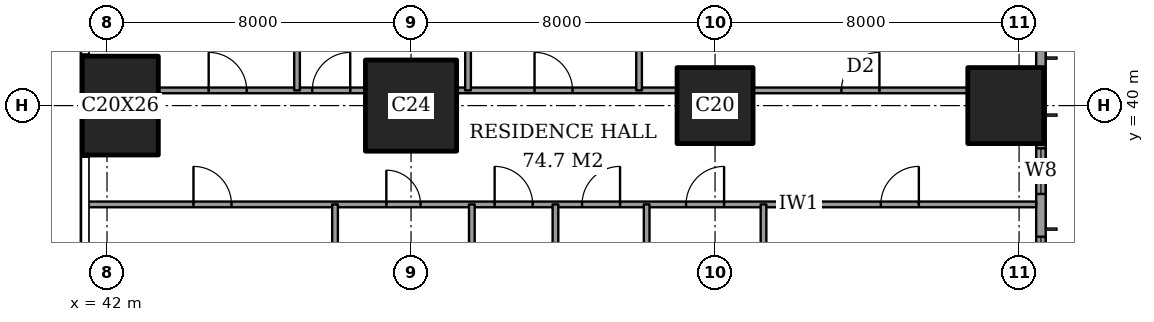
"""IFC4 building model, lengths in metres.
Left out: names, types, materials, properties, quantities, classifications, styles, units other than length and angle.
Written with IfcOpenShell. Run it as: python <this file> out.ifc"""

import sys

from ifc_helpers import new_model, si_unit, direction, frame, frame_2d, origin, origin_2d, place, context, subcontext, project, spatial, rectangle, extrude, element, fill, save


model = new_model("IFC4")
c1 = context("Model", 3, precision=1e-05, world=origin(), true_north=direction((0.0, 1.0)))
c2 = subcontext(c1, "Body", "Model", "MODEL_VIEW")
j1 = project(units=[si_unit("LENGTHUNIT", "METRE"), si_unit("PLANEANGLEUNIT", "RADIAN")], contexts=[c1])
p1 = place(None, origin())
s1 = spatial("IfcSite", under=j1, at=p1, CompositionType="ELEMENT")
p2 = place(p1, origin())
s2 = spatial("IfcBuilding", under=s1, at=p2, CompositionType="ELEMENT")
p3 = place(p2, frame((0.0, 0.0, 76.4)))
s3 = spatial("IfcBuildingStorey", under=s2, at=p3, CompositionType="ELEMENT", Elevation=76.4)
p4 = place(p3, frame((42.35, 40.0, 0.0), z_axis=(0.0, 0.0, 1.0), x_axis=(1.0, 0.0, 0.0)))
e1 = element("IfcColumn", 1, at=p4, inside=s3, PredefinedType="COLUMN", context=c2, shape_type="SweptSolid", body=[
    extrude(rectangle(XDim=2.0, YDim=2.6, at=origin_2d()), origin(), (0.0, 0.0, 1.0), 3.6),
])
p5 = place(p3, frame((50.0, 40.0, 0.0), z_axis=(0.0, 0.0, 1.0), x_axis=(1.0, 0.0, 0.0)))
e2 = element("IfcColumn", 2, at=p5, inside=s3, PredefinedType="COLUMN", context=c2, shape_type="SweptSolid", body=[
    extrude(rectangle(XDim=2.4, YDim=2.4, at=origin_2d()), origin(), (0.0, 0.0, 1.0), 3.6),
])
for number, where, z_axis, x_axis in (
    (3, (58.0, 40.0, 0.0), (0.0, 0.0, 1.0), (1.0, 0.0, 0.0)),
    (4, (65.65, 40.0, 0.0), (0.0, 0.0, 1.0), (1.0, 0.0, 0.0)),
):
    element("IfcColumn", number, at=place(p3, frame(where, z_axis=z_axis, x_axis=x_axis)), inside=s3, PredefinedType="COLUMN", context=c2, shape_type="SweptSolid", body=[
        extrude(rectangle(XDim=2.0, YDim=2.0, at=origin_2d()), origin(), (0.0, 0.0, 1.0), 3.6),
    ])
p6 = place(p3, frame((66.575, 3.175, 0.0), z_axis=(0.0, 0.0, 1.0), x_axis=(0.0, 1.0, 0.0)))
e5 = element("IfcWall", 5, at=p6, inside=s3, PredefinedType="SOLIDWALL", context=c2, shape_type="SweptSolid", body=[
    extrude(rectangle(XDim=41.65, YDim=0.25, at=frame_2d((20.825, 0.0))), origin(), (0.0, 0.0, 1.0), 3.6),
])
p7 = place(p6, frame((0.775, 0.0, 0.6)))
e6 = element("IfcOpeningElement", 6, at=p7, cuts=e5, PredefinedType="OPENING", context=c2, shape_type="SweptSolid", body=[
    extrude(rectangle(XDim=2.4, YDim=2.0, at=frame_2d((1.2, 1.0))), frame((0.0, 0.135, 0.0), z_axis=(0.0, -1.0, 0.0), x_axis=(1.0, 0.0, 0.0)), (0.0, 0.0, 1.0), 0.27),
])
p8 = place(p6, frame((6.1, 0.0, 0.6)))
e7 = element("IfcOpeningElement", 7, at=p8, cuts=e5, PredefinedType="OPENING", context=c2, shape_type="SweptSolid", body=[
    extrude(rectangle(XDim=1.2, YDim=2.0, at=frame_2d((0.6, 1.0))), frame((0.0, 0.135, 0.0), z_axis=(0.0, -1.0, 0.0), x_axis=(1.0, 0.0, 0.0)), (0.0, 0.0, 1.0), 0.27),
])
p9 = place(p6, frame((8.275, 0.0, 0.6)))
e8 = element("IfcOpeningElement", 8, at=p9, cuts=e5, PredefinedType="OPENING", context=c2, shape_type="SweptSolid", body=[
    extrude(rectangle(XDim=2.4, YDim=2.0, at=frame_2d((1.2, 1.0))), frame((0.0, 0.135, 0.0), z_axis=(0.0, -1.0, 0.0), x_axis=(1.0, 0.0, 0.0)), (0.0, 0.0, 1.0), 0.27),
])
p10 = place(p6, frame((15.775, 0.0, 0.6)))
e9 = element("IfcOpeningElement", 9, at=p10, cuts=e5, PredefinedType="OPENING", context=c2, shape_type="SweptSolid", body=[
    extrude(rectangle(XDim=2.4, YDim=2.0, at=frame_2d((1.2, 1.0))), frame((0.0, 0.135, 0.0), z_axis=(0.0, -1.0, 0.0), x_axis=(1.0, 0.0, 0.0)), (0.0, 0.0, 1.0), 0.27),
])
p11 = place(p6, frame((23.475, 0.0, 0.6)))
e10 = element("IfcOpeningElement", 10, at=p11, cuts=e5, PredefinedType="OPENING", context=c2, shape_type="SweptSolid", body=[
    extrude(rectangle(XDim=2.4, YDim=2.0, at=frame_2d((1.2, 1.0))), frame((0.0, 0.135, 0.0), z_axis=(0.0, -1.0, 0.0), x_axis=(1.0, 0.0, 0.0)), (0.0, 0.0, 1.0), 0.27),
])
p12 = place(p6, frame((30.975, 0.0, 0.6)))
e11 = element("IfcOpeningElement", 11, at=p12, cuts=e5, PredefinedType="OPENING", context=c2, shape_type="SweptSolid", body=[
    extrude(rectangle(XDim=2.4, YDim=2.0, at=frame_2d((1.2, 1.0))), frame((0.0, 0.135, 0.0), z_axis=(0.0, -1.0, 0.0), x_axis=(1.0, 0.0, 0.0)), (0.0, 0.0, 1.0), 0.27),
])
p13 = place(p6, frame((34.5, 0.0, 0.6)))
e12 = element("IfcOpeningElement", 12, at=p13, cuts=e5, PredefinedType="OPENING", context=c2, shape_type="SweptSolid", body=[
    extrude(rectangle(XDim=1.2, YDim=2.0, at=frame_2d((0.6, 1.0))), frame((0.0, 0.135, 0.0), z_axis=(0.0, -1.0, 0.0), x_axis=(1.0, 0.0, 0.0)), (0.0, 0.0, 1.0), 0.27),
])
p14 = place(p6, frame((38.475, 0.0, 0.6)))
e13 = element("IfcOpeningElement", 13, at=p14, cuts=e5, PredefinedType="OPENING", context=c2, shape_type="SweptSolid", body=[
    extrude(rectangle(XDim=2.4, YDim=2.0, at=frame_2d((1.2, 1.0))), frame((0.0, 0.135, 0.0), z_axis=(0.0, -1.0, 0.0), x_axis=(1.0, 0.0, 0.0)), (0.0, 0.0, 1.0), 0.27),
])
p15 = place(p3, frame((41.439, 37.4, 0.0), z_axis=(0.0, 0.0, 1.0), x_axis=(1.0, 0.0, 0.0)))
e14 = element("IfcWall", 14, at=p15, inside=s3, PredefinedType="PARTITIONING", context=c2, shape_type="SweptSolid", body=[
    extrude(rectangle(XDim=25.011, YDim=0.15, at=frame_2d((12.505, 0.0))), origin(), (0.0, 0.0, 1.0), 3.35),
])
p16 = place(p15, frame((10.761, 0.0, 0.0)))
e15 = element("IfcOpeningElement", 15, at=p16, cuts=e14, PredefinedType="OPENING", context=c2, shape_type="SweptSolid", body=[
    extrude(rectangle(XDim=1.0, YDim=2.1, at=frame_2d((0.5, 1.05))), frame((0.0, 0.085, 0.0), z_axis=(0.0, -1.0, 0.0), x_axis=(1.0, 0.0, 0.0)), (0.0, 0.0, 1.0), 0.17),
])
p17 = place(p15, frame((20.924, 0.0, 0.0)))
e16 = element("IfcOpeningElement", 16, at=p17, cuts=e14, PredefinedType="OPENING", context=c2, shape_type="SweptSolid", body=[
    extrude(rectangle(XDim=1.0, YDim=2.1, at=frame_2d((0.5, 1.05))), frame((0.0, 0.085, 0.0), z_axis=(0.0, -1.0, 0.0), x_axis=(1.0, 0.0, 0.0)), (0.0, 0.0, 1.0), 0.17),
])
p18 = place(p15, frame((15.799, 0.0, 0.0)))
e17 = element("IfcOpeningElement", 17, at=p18, cuts=e14, PredefinedType="OPENING", context=c2, shape_type="SweptSolid", body=[
    extrude(rectangle(XDim=1.0, YDim=2.1, at=frame_2d((0.5, 1.05))), frame((0.0, 0.085, 0.0), z_axis=(0.0, -1.0, 0.0), x_axis=(1.0, 0.0, 0.0)), (0.0, 0.0, 1.0), 0.17),
])
p19 = place(p15, frame((13.061, 0.0, 0.0)))
e18 = element("IfcOpeningElement", 18, at=p19, cuts=e14, PredefinedType="OPENING", context=c2, shape_type="SweptSolid", body=[
    extrude(rectangle(XDim=1.0, YDim=2.1, at=frame_2d((0.5, 1.05))), frame((0.0, 0.085, 0.0), z_axis=(0.0, -1.0, 0.0), x_axis=(1.0, 0.0, 0.0)), (0.0, 0.0, 1.0), 0.17),
])
p20 = place(p15, frame((7.911, 0.0, 0.0)))
e19 = element("IfcOpeningElement", 19, at=p20, cuts=e14, PredefinedType="OPENING", context=c2, shape_type="SweptSolid", body=[
    extrude(rectangle(XDim=0.9, YDim=2.1, at=frame_2d((0.45, 1.05))), frame((0.0, 0.085, 0.0), z_axis=(0.0, -1.0, 0.0), x_axis=(1.0, 0.0, 0.0)), (0.0, 0.0, 1.0), 0.17),
])
p21 = place(p15, frame((2.836, 0.0, 0.0)))
e20 = element("IfcOpeningElement", 20, at=p21, cuts=e14, PredefinedType="OPENING", context=c2, shape_type="SweptSolid", body=[
    extrude(rectangle(XDim=1.0, YDim=2.1, at=frame_2d((0.5, 1.05))), frame((0.0, 0.085, 0.0), z_axis=(0.0, -1.0, 0.0), x_axis=(1.0, 0.0, 0.0)), (0.0, 0.0, 1.0), 0.17),
])
p22 = place(p3, frame((43.35, 40.4, 0.0), z_axis=(0.0, 0.0, 1.0), x_axis=(1.0, 0.0, 0.0)))
e21 = element("IfcWall", 21, at=p22, inside=s3, PredefinedType="PARTITIONING", context=c2, shape_type="SweptSolid", body=[
    extrude(rectangle(XDim=5.45, YDim=0.15, at=frame_2d((2.725, 0.0))), origin(), (0.0, 0.0, 1.0), 3.35),
])
p23 = place(p22, frame((4.05, 0.0, 0.0)))
e22 = element("IfcOpeningElement", 22, at=p23, cuts=e21, PredefinedType="OPENING", context=c2, shape_type="SweptSolid", body=[
    extrude(rectangle(XDim=1.0, YDim=2.1, at=frame_2d((0.5, 1.05))), frame((0.0, 0.085, 0.0), z_axis=(0.0, -1.0, 0.0), x_axis=(1.0, 0.0, 0.0)), (0.0, 0.0, 1.0), 0.17),
])
p24 = place(p22, frame((1.325, 0.0, 0.0)))
e23 = element("IfcOpeningElement", 23, at=p24, cuts=e21, PredefinedType="OPENING", context=c2, shape_type="SweptSolid", body=[
    extrude(rectangle(XDim=1.0, YDim=2.1, at=frame_2d((0.5, 1.05))), frame((0.0, 0.085, 0.0), z_axis=(0.0, -1.0, 0.0), x_axis=(1.0, 0.0, 0.0)), (0.0, 0.0, 1.0), 0.17),
])
p25 = place(p3, frame((51.2, 40.4, 0.0), z_axis=(0.0, 0.0, 1.0), x_axis=(1.0, 0.0, 0.0)))
e24 = element("IfcWall", 24, at=p25, inside=s3, PredefinedType="PARTITIONING", context=c2, shape_type="SweptSolid", body=[
    extrude(rectangle(XDim=5.8, YDim=0.15, at=frame_2d((2.9, 0.0))), origin(), (0.0, 0.0, 1.0), 3.35),
])
p26 = place(p25, frame((2.05, 0.0, 0.0)))
e25 = element("IfcOpeningElement", 25, at=p26, cuts=e24, PredefinedType="OPENING", context=c2, shape_type="SweptSolid", body=[
    extrude(rectangle(XDim=1.0, YDim=2.1, at=frame_2d((0.5, 1.05))), frame((0.0, 0.085, 0.0), z_axis=(0.0, -1.0, 0.0), x_axis=(1.0, 0.0, 0.0)), (0.0, 0.0, 1.0), 0.17),
])
p27 = place(p3, frame((59.0, 40.4, 0.0), z_axis=(0.0, 0.0, 1.0), x_axis=(1.0, 0.0, 0.0)))
e26 = element("IfcWall", 26, at=p27, inside=s3, PredefinedType="PARTITIONING", context=c2, shape_type="SweptSolid", body=[
    extrude(rectangle(XDim=5.65, YDim=0.15, at=frame_2d((2.825, 0.0))), origin(), (0.0, 0.0, 1.0), 3.35),
])
p28 = place(p27, frame((2.325, 0.0, 0.0)))
e27 = element("IfcOpeningElement", 27, at=p28, cuts=e26, PredefinedType="OPENING", context=c2, shape_type="SweptSolid", body=[
    extrude(rectangle(XDim=1.0, YDim=2.1, at=frame_2d((0.5, 1.05))), frame((0.0, 0.085, 0.0), z_axis=(0.0, -1.0, 0.0), x_axis=(1.0, 0.0, 0.0)), (0.0, 0.0, 1.0), 0.17),
])
p29 = place(p3, frame((47.0, 40.4, 0.0), z_axis=(0.0, 0.0, 1.0), x_axis=(0.0, 1.0, 0.0)))
e28 = element("IfcWall", 28, at=p29, inside=s3, PredefinedType="PARTITIONING", context=c2, shape_type="SweptSolid", body=[
    extrude(rectangle(XDim=8.05, YDim=0.15, at=frame_2d((4.025, 0.0))), origin(), (0.0, 0.0, 1.0), 3.35),
])
p30 = place(p3, frame((48.0, 28.0, 0.0), z_axis=(0.0, 0.0, 1.0), x_axis=(0.0, 1.0, 0.0)))
e29 = element("IfcWall", 29, at=p30, inside=s3, PredefinedType="PARTITIONING", context=c2, shape_type="SweptSolid", body=[
    extrude(rectangle(XDim=9.4, YDim=0.15, at=frame_2d((4.7, 0.0))), origin(), (0.0, 0.0, 1.0), 3.35),
])
p31 = place(p30, frame((0.325, 0.0, 0.0)))
e30 = element("IfcOpeningElement", 30, at=p31, cuts=e29, PredefinedType="OPENING", context=c2, shape_type="SweptSolid", body=[
    extrude(rectangle(XDim=0.9, YDim=2.1, at=frame_2d((0.45, 1.05))), frame((0.0, 0.085, 0.0), z_axis=(0.0, -1.0, 0.0), x_axis=(1.0, 0.0, 0.0)), (0.0, 0.0, 1.0), 0.17),
])
p32 = place(p3, frame((51.5, 40.4, 0.0), z_axis=(0.0, 0.0, 1.0), x_axis=(0.0, 1.0, 0.0)))
e31 = element("IfcWall", 31, at=p32, inside=s3, PredefinedType="PARTITIONING", context=c2, shape_type="SweptSolid", body=[
    extrude(rectangle(XDim=8.05, YDim=0.15, at=frame_2d((4.025, 0.0))), origin(), (0.0, 0.0, 1.0), 3.35),
])
for number, where, z_axis, x_axis in (
    (32, (51.6, 29.55, 0.0), (0.0, 0.0, 1.0), (0.0, 1.0, 0.0)),
    (33, (53.8, 29.55, 0.0), (0.0, 0.0, 1.0), (0.0, 1.0, 0.0)),
):
    element("IfcWall", number, at=place(p3, frame(where, z_axis=z_axis, x_axis=x_axis)), inside=s3, PredefinedType="PARTITIONING", context=c2, shape_type="SweptSolid", body=[
        extrude(rectangle(XDim=7.85, YDim=0.15, at=frame_2d((3.925, 0.0))), origin(), (0.0, 0.0, 1.0), 3.35),
    ])
p33 = place(p3, frame((56.0, 40.4, 0.0), z_axis=(0.0, 0.0, 1.0), x_axis=(0.0, 1.0, 0.0)))
e34 = element("IfcWall", 34, at=p33, inside=s3, PredefinedType="PARTITIONING", context=c2, shape_type="SweptSolid", body=[
    extrude(rectangle(XDim=8.05, YDim=0.15, at=frame_2d((4.025, 0.0))), origin(), (0.0, 0.0, 1.0), 3.35),
])
p34 = place(p3, frame((56.2, 28.0, 0.0), z_axis=(0.0, 0.0, 1.0), x_axis=(0.0, 1.0, 0.0)))
e35 = element("IfcWall", 35, at=p34, inside=s3, PredefinedType="PARTITIONING", context=c2, shape_type="SweptSolid", body=[
    extrude(rectangle(XDim=9.4, YDim=0.15, at=frame_2d((4.7, 0.0))), origin(), (0.0, 0.0, 1.0), 3.35),
])
p35 = place(p34, frame((0.325, 0.0, 0.0)))
e36 = element("IfcOpeningElement", 36, at=p35, cuts=e35, PredefinedType="OPENING", context=c2, shape_type="SweptSolid", body=[
    extrude(rectangle(XDim=0.9, YDim=2.1, at=frame_2d((0.45, 1.05))), frame((0.0, 0.085, 0.0), z_axis=(0.0, -1.0, 0.0), x_axis=(1.0, 0.0, 0.0)), (0.0, 0.0, 1.0), 0.17),
])
p36 = place(p3, frame((59.275, 33.2, 0.0), z_axis=(0.0, 0.0, 1.0), x_axis=(0.0, 1.0, 0.0)))
e37 = element("IfcWall", 37, at=p36, inside=s3, PredefinedType="PARTITIONING", context=c2, shape_type="SweptSolid", body=[
    extrude(rectangle(XDim=4.2, YDim=0.15, at=frame_2d((2.1, 0.0))), origin(), (0.0, 0.0, 1.0), 3.35),
])
p37 = place(p12, origin())
e38 = element("IfcWindow", 38, at=p37, inside=s3, PartitioningType="SINGLE_PANEL", PredefinedType="WINDOW", context=c2, shape_type="SweptSolid", body=[
    extrude(rectangle(XDim=2.4, YDim=2.0, at=frame_2d((1.2, 1.0))), frame((0.0, 0.03, 0.0), z_axis=(0.0, -1.0, 0.0), x_axis=(1.0, 0.0, 0.0)), (0.0, 0.0, 1.0), 0.06),
])
fill(e11, e38)
p38 = place(p13, origin())
e39 = element("IfcWindow", 39, at=p38, inside=s3, PartitioningType="SINGLE_PANEL", PredefinedType="WINDOW", context=c2, shape_type="SweptSolid", body=[
    extrude(rectangle(XDim=1.2, YDim=2.0, at=frame_2d((0.6, 1.0))), frame((0.0, 0.03, 0.0), z_axis=(0.0, -1.0, 0.0), x_axis=(1.0, 0.0, 0.0)), (0.0, 0.0, 1.0), 0.06),
])
fill(e12, e39)
p39 = place(p28, origin())
e40 = element("IfcDoor", 40, at=p39, inside=s3, OperationType="SINGLE_SWING_LEFT", PredefinedType="DOOR", context=c2, shape_type="SweptSolid", body=[
    extrude(rectangle(XDim=1.0, YDim=2.1, at=frame_2d((0.5, 1.05))), frame((0.0, 0.025, 0.0), z_axis=(0.0, -1.0, 0.0), x_axis=(1.0, 0.0, 0.0)), (0.0, 0.0, 1.0), 0.05),
])
fill(e27, e40)
p40 = place(p26, origin())
e41 = element("IfcDoor", 41, at=p40, inside=s3, OperationType="SINGLE_SWING_RIGHT", PredefinedType="DOOR", context=c2, shape_type="SweptSolid", body=[
    extrude(rectangle(XDim=1.0, YDim=2.1, at=frame_2d((0.5, 1.05))), frame((0.0, 0.025, 0.0), z_axis=(0.0, -1.0, 0.0), x_axis=(1.0, 0.0, 0.0)), (0.0, 0.0, 1.0), 0.05),
])
fill(e25, e41)
p41 = place(p23, origin())
e42 = element("IfcDoor", 42, at=p41, inside=s3, OperationType="SINGLE_SWING_LEFT", PredefinedType="DOOR", context=c2, shape_type="SweptSolid", body=[
    extrude(rectangle(XDim=1.0, YDim=2.1, at=frame_2d((0.5, 1.05))), frame((0.0, 0.025, 0.0), z_axis=(0.0, -1.0, 0.0), x_axis=(1.0, 0.0, 0.0)), (0.0, 0.0, 1.0), 0.05),
])
fill(e22, e42)
p42 = place(p24, origin())
e43 = element("IfcDoor", 43, at=p42, inside=s3, OperationType="SINGLE_SWING_RIGHT", PredefinedType="DOOR", context=c2, shape_type="SweptSolid", body=[
    extrude(rectangle(XDim=1.0, YDim=2.1, at=frame_2d((0.5, 1.05))), frame((0.0, 0.025, 0.0), z_axis=(0.0, -1.0, 0.0), x_axis=(1.0, 0.0, 0.0)), (0.0, 0.0, 1.0), 0.05),
])
fill(e23, e43)
p43 = place(p16, origin())
e44 = element("IfcDoor", 44, at=p43, inside=s3, OperationType="SINGLE_SWING_RIGHT", PredefinedType="DOOR", context=c2, shape_type="SweptSolid", body=[
    extrude(rectangle(XDim=1.0, YDim=2.1, at=frame_2d((0.5, 1.05))), frame((0.0, 0.025, 0.0), z_axis=(0.0, -1.0, 0.0), x_axis=(1.0, 0.0, 0.0)), (0.0, 0.0, 1.0), 0.05),
])
fill(e15, e44)
p44 = place(p17, origin())
e45 = element("IfcDoor", 45, at=p44, inside=s3, OperationType="SINGLE_SWING_LEFT", PredefinedType="DOOR", context=c2, shape_type="SweptSolid", body=[
    extrude(rectangle(XDim=1.0, YDim=2.1, at=frame_2d((0.5, 1.05))), frame((0.0, 0.025, 0.0), z_axis=(0.0, -1.0, 0.0), x_axis=(1.0, 0.0, 0.0)), (0.0, 0.0, 1.0), 0.05),
])
fill(e16, e45)
p45 = place(p18, origin())
e46 = element("IfcDoor", 46, at=p45, inside=s3, OperationType="SINGLE_SWING_LEFT", PredefinedType="DOOR", context=c2, shape_type="SweptSolid", body=[
    extrude(rectangle(XDim=1.0, YDim=2.1, at=frame_2d((0.5, 1.05))), frame((0.0, 0.025, 0.0), z_axis=(0.0, -1.0, 0.0), x_axis=(1.0, 0.0, 0.0)), (0.0, 0.0, 1.0), 0.05),
])
fill(e17, e46)
p46 = place(p19, origin())
e47 = element("IfcDoor", 47, at=p46, inside=s3, OperationType="SINGLE_SWING_LEFT", PredefinedType="DOOR", context=c2, shape_type="SweptSolid", body=[
    extrude(rectangle(XDim=1.0, YDim=2.1, at=frame_2d((0.5, 1.05))), frame((0.0, 0.025, 0.0), z_axis=(0.0, -1.0, 0.0), x_axis=(1.0, 0.0, 0.0)), (0.0, 0.0, 1.0), 0.05),
])
fill(e18, e47)
p47 = place(p20, origin())
e48 = element("IfcDoor", 48, at=p47, inside=s3, OperationType="SINGLE_SWING_RIGHT", PredefinedType="DOOR", context=c2, shape_type="SweptSolid", body=[
    extrude(rectangle(XDim=0.9, YDim=2.1, at=frame_2d((0.45, 1.05))), frame((0.0, 0.025, 0.0), z_axis=(0.0, -1.0, 0.0), x_axis=(1.0, 0.0, 0.0)), (0.0, 0.0, 1.0), 0.05),
])
fill(e19, e48)
p48 = place(p21, origin())
e49 = element("IfcDoor", 49, at=p48, inside=s3, OperationType="SINGLE_SWING_RIGHT", PredefinedType="DOOR", context=c2, shape_type="SweptSolid", body=[
    extrude(rectangle(XDim=1.0, YDim=2.1, at=frame_2d((0.5, 1.05))), frame((0.0, 0.025, 0.0), z_axis=(0.0, -1.0, 0.0), x_axis=(1.0, 0.0, 0.0)), (0.0, 0.0, 1.0), 0.05),
])
fill(e20, e49)
save(model, sys.argv[1])
